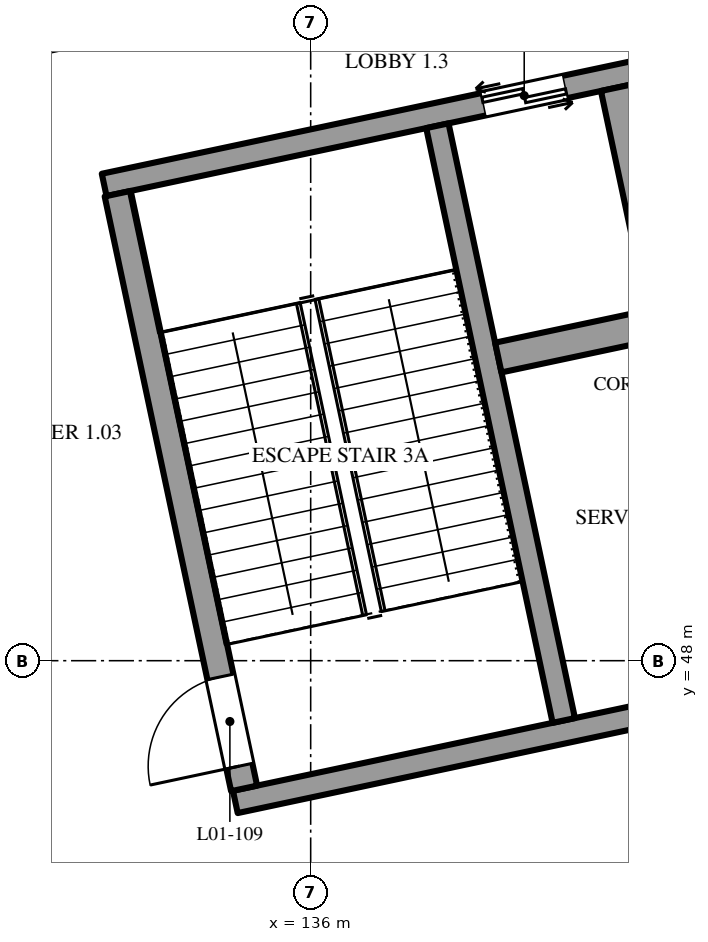
"""IFC4 building model, lengths in metres.
Left out: names, types, materials, properties, quantities, classifications, styles, units other than length and angle.
Written with IfcOpenShell. Run it as: python <this file> out.ifc"""

import sys

from ifc_helpers import new_model, si_unit, direction, frame, frame_2d, origin, place, context, subcontext, project, spatial, rectangle, extrude, element, fill, save


model = new_model("IFC4")
c1 = context("Model", 3, precision=1e-05, world=origin(), true_north=direction((0.0, 1.0)))
c2 = subcontext(c1, "Body", "Model", "MODEL_VIEW")
j1 = project(units=[si_unit("LENGTHUNIT", "METRE"), si_unit("PLANEANGLEUNIT", "RADIAN")], contexts=[c1])
p1 = place(None, origin())
s1 = spatial("IfcSite", under=j1, at=p1, CompositionType="ELEMENT")
p2 = place(p1, origin())
s2 = spatial("IfcBuilding", under=s1, at=p2, CompositionType="ELEMENT")
p3 = place(p2, frame((0.0, 0.0, 7.2)))
s3 = spatial("IfcBuildingStorey", under=s2, at=p3, CompositionType="ELEMENT", Elevation=7.2)
p4 = place(p3, frame((135.009, 46.142, 0.0), z_axis=(0.0, 0.0, 1.0), x_axis=(0.978147662755, 0.20791139903, 0.0)))
e1 = element("IfcWall", 1, at=p4, inside=s3, PredefinedType="SHEAR", context=c2, shape_type="SweptSolid", body=[
    extrude(rectangle(XDim=13.7, YDim=0.3, at=frame_2d((6.85, 0.0))), origin(), (0.0, 0.0, 1.0), 4.8),
])
p5 = place(p4, frame((6.35, 0.0, 0.0)))
e2 = element("IfcOpeningElement", 2, at=p5, cuts=e1, PredefinedType="OPENING", context=c2, shape_type="SweptSolid", body=[
    extrude(rectangle(XDim=1.0, YDim=2.1, at=frame_2d((0.5, 1.05))), frame((0.0, 0.16, 0.0), z_axis=(0.0, -1.0, 0.0), x_axis=(1.0, 0.0, 0.0)), (0.0, 0.0, 1.0), 0.32),
])
p6 = place(p3, frame((133.283, 54.26, 0.0), z_axis=(0.0, 0.0, 1.0), x_axis=(0.978147662755, 0.20791139903, 0.0)))
e3 = element("IfcWall", 3, at=p6, inside=s3, PredefinedType="SHEAR", context=c2, shape_type="SweptSolid", body=[
    extrude(rectangle(XDim=13.7, YDim=0.3, at=frame_2d((6.85, 0.0))), origin(), (0.0, 0.0, 1.0), 4.8),
])
p7 = place(p6, frame((5.1, 0.0, 0.0)))
e4 = element("IfcOpeningElement", 4, at=p7, cuts=e3, PredefinedType="OPENING", context=c2, shape_type="SweptSolid", body=[
    extrude(rectangle(XDim=1.1, YDim=2.1, at=frame_2d((0.55, 1.05))), frame((0.0, 0.16, 0.0), z_axis=(0.0, -1.0, 0.0), x_axis=(1.0, 0.0, 0.0)), (0.0, 0.0, 1.0), 0.32),
])
p8 = place(p6, frame((7.5, 0.0, 0.0)))
e5 = element("IfcOpeningElement", 5, at=p8, cuts=e3, PredefinedType="OPENING", context=c2, shape_type="SweptSolid", body=[
    extrude(rectangle(XDim=1.1, YDim=2.1, at=frame_2d((0.55, 1.05))), frame((0.0, 0.16, 0.0), z_axis=(0.0, -1.0, 0.0), x_axis=(1.0, 0.0, 0.0)), (0.0, 0.0, 1.0), 0.32),
])
p9 = place(p3, frame((135.124, 46.32, 0.0), z_axis=(0.0, 0.0, 1.0), x_axis=(-0.207886494942, 0.978152955943, 0.0)))
e6 = element("IfcWall", 6, at=p9, inside=s3, PredefinedType="SOLIDWALL", context=c2, shape_type="SweptSolid", body=[
    extrude(rectangle(XDim=8.0, YDim=0.35, at=frame_2d((4.0, 0.0))), origin(), (0.0, 0.0, 1.0), 4.8),
])
p10 = place(p9, frame((0.3, 0.0, 0.0)))
e7 = element("IfcOpeningElement", 7, at=p10, cuts=e6, PredefinedType="OPENING", context=c2, shape_type="SweptSolid", body=[
    extrude(rectangle(XDim=1.2, YDim=2.1, at=frame_2d((0.6, 1.05))), frame((0.0, 0.185, 0.0), z_axis=(0.0, -1.0, 0.0), x_axis=(1.0, 0.0, 0.0)), (0.0, 0.0, 1.0), 0.37),
])
p11 = place(p3, frame((139.33, 47.214, 0.0), z_axis=(0.0, 0.0, 1.0), x_axis=(-0.207915693476, 0.978146749934, 0.0)))
e8 = element("IfcWall", 8, at=p11, inside=s3, PredefinedType="SHEAR", context=c2, shape_type="SweptSolid", body=[
    extrude(rectangle(XDim=8.0, YDim=0.3, at=frame_2d((4.0, 0.0))), origin(), (0.0, 0.0, 1.0), 4.8),
])
p12 = place(p3, frame((140.638, 52.603, 0.0), z_axis=(0.0, 0.0, 1.0), x_axis=(-0.207917150959, 0.978146440129, 0.0)))
e9 = element("IfcWall", 9, at=p12, inside=s3, PredefinedType="SHEAR", context=c2, shape_type="SweptSolid", body=[
    extrude(rectangle(XDim=3.0, YDim=0.4, at=frame_2d((1.5, 0.0))), origin(), (0.0, 0.0, 1.0), 4.8),
])
p13 = place(p3, frame((138.469, 51.989, 0.0), z_axis=(0.0, 0.0, 1.0), x_axis=(0.978149611564, 0.20790223038, 0.0)))
e10 = element("IfcWall", 10, at=p13, inside=s3, PredefinedType="SHEAR", context=c2, shape_type="SweptSolid", body=[
    extrude(rectangle(XDim=4.5, YDim=0.4, at=frame_2d((2.25, 0.0))), origin(), (0.0, 0.0, 1.0), 4.8),
])
p14 = place(p3, frame((115.369, 52.446, 0.0), z_axis=(0.0, 0.0, 1.0), x_axis=(0.978147028863, 0.207914381239, 0.0)))
e11 = element("IfcWall", 11, at=p14, inside=s3, PredefinedType="PARTITIONING", context=c2, shape_type="SweptSolid", body=[
    extrude(rectangle(XDim=49.5, YDim=0.15, at=frame_2d((24.75, 0.0))), origin(), (0.0, 0.0, 1.0), 3.75),
])
p15 = place(p14, frame((1.8, 0.0, 0.0)))
e12 = element("IfcOpeningElement", 12, at=p15, cuts=e11, PredefinedType="OPENING", context=c2, shape_type="SweptSolid", body=[
    extrude(rectangle(XDim=0.9, YDim=2.1, at=frame_2d((0.45, 1.05))), frame((0.0, 0.085, 0.0), z_axis=(0.0, -1.0, 0.0), x_axis=(1.0, 0.0, 0.0)), (0.0, 0.0, 1.0), 0.17),
])
p16 = place(p14, frame((6.3, 0.0, 0.0)))
e13 = element("IfcOpeningElement", 13, at=p16, cuts=e11, PredefinedType="OPENING", context=c2, shape_type="SweptSolid", body=[
    extrude(rectangle(XDim=0.9, YDim=2.1, at=frame_2d((0.45, 1.05))), frame((0.0, 0.085, 0.0), z_axis=(0.0, -1.0, 0.0), x_axis=(1.0, 0.0, 0.0)), (0.0, 0.0, 1.0), 0.17),
])
p17 = place(p14, frame((10.7, 0.0, 0.0)))
e14 = element("IfcOpeningElement", 14, at=p17, cuts=e11, PredefinedType="OPENING", context=c2, shape_type="SweptSolid", body=[
    extrude(rectangle(XDim=1.1, YDim=2.1, at=frame_2d((0.55, 1.05))), frame((0.0, 0.085, 0.0), z_axis=(0.0, -1.0, 0.0), x_axis=(1.0, 0.0, 0.0)), (0.0, 0.0, 1.0), 0.17),
])
p18 = place(p14, frame((15.25, 0.0, 0.0)))
e15 = element("IfcOpeningElement", 15, at=p18, cuts=e11, PredefinedType="OPENING", context=c2, shape_type="SweptSolid", body=[
    extrude(rectangle(XDim=1.0, YDim=2.1, at=frame_2d((0.5, 1.05))), frame((0.0, 0.085, 0.0), z_axis=(0.0, -1.0, 0.0), x_axis=(1.0, 0.0, 0.0)), (0.0, 0.0, 1.0), 0.17),
])
p19 = place(p14, frame((19.75, 0.0, 0.0)))
e16 = element("IfcOpeningElement", 16, at=p19, cuts=e11, PredefinedType="OPENING", context=c2, shape_type="SweptSolid", body=[
    extrude(rectangle(XDim=1.0, YDim=2.1, at=frame_2d((0.5, 1.05))), frame((0.0, 0.085, 0.0), z_axis=(0.0, -1.0, 0.0), x_axis=(1.0, 0.0, 0.0)), (0.0, 0.0, 1.0), 0.17),
])
p20 = place(p14, frame((28.35, 0.0, 0.0)))
e17 = element("IfcOpeningElement", 17, at=p20, cuts=e11, PredefinedType="OPENING", context=c2, shape_type="SweptSolid", body=[
    extrude(rectangle(XDim=1.8, YDim=2.1, at=frame_2d((0.9, 1.05))), frame((0.0, 0.085, 0.0), z_axis=(0.0, -1.0, 0.0), x_axis=(1.0, 0.0, 0.0)), (0.0, 0.0, 1.0), 0.17),
])
p21 = place(p14, frame((39.6, 0.0, 0.0)))
e18 = element("IfcOpeningElement", 18, at=p21, cuts=e11, PredefinedType="OPENING", context=c2, shape_type="SweptSolid", body=[
    extrude(rectangle(XDim=1.8, YDim=2.1, at=frame_2d((0.9, 1.05))), frame((0.0, 0.085, 0.0), z_axis=(0.0, -1.0, 0.0), x_axis=(1.0, 0.0, 0.0)), (0.0, 0.0, 1.0), 0.17),
])
p22 = place(p14, frame((46.8, 0.0, 0.0)))
e19 = element("IfcOpeningElement", 19, at=p22, cuts=e11, PredefinedType="OPENING", context=c2, shape_type="SweptSolid", body=[
    extrude(rectangle(XDim=0.9, YDim=2.1, at=frame_2d((0.45, 1.05))), frame((0.0, 0.085, 0.0), z_axis=(0.0, -1.0, 0.0), x_axis=(1.0, 0.0, 0.0)), (0.0, 0.0, 1.0), 0.17),
])
p23 = place(p7, origin())
e20 = element("IfcDoor", 20, at=p23, inside=s3, OperationType="DOUBLE_DOOR_SLIDING", PredefinedType="DOOR", context=c2, shape_type="SweptSolid", body=[
    extrude(rectangle(XDim=1.1, YDim=2.1, at=frame_2d((0.55, 1.05))), frame((0.0, 0.025, 0.0), z_axis=(0.0, -1.0, 0.0), x_axis=(1.0, 0.0, 0.0)), (0.0, 0.0, 1.0), 0.05),
])
fill(e4, e20)
p24 = place(p10, origin())
e21 = element("IfcDoor", 21, at=p24, inside=s3, OperationType="SINGLE_SWING_LEFT", PredefinedType="DOOR", context=c2, shape_type="SweptSolid", body=[
    extrude(rectangle(XDim=1.2, YDim=2.1, at=frame_2d((0.6, 1.05))), frame((0.0, 0.025, 0.0), z_axis=(0.0, -1.0, 0.0), x_axis=(1.0, 0.0, 0.0)), (0.0, 0.0, 1.0), 0.05),
])
fill(e7, e21)
save(model, sys.argv[1])
